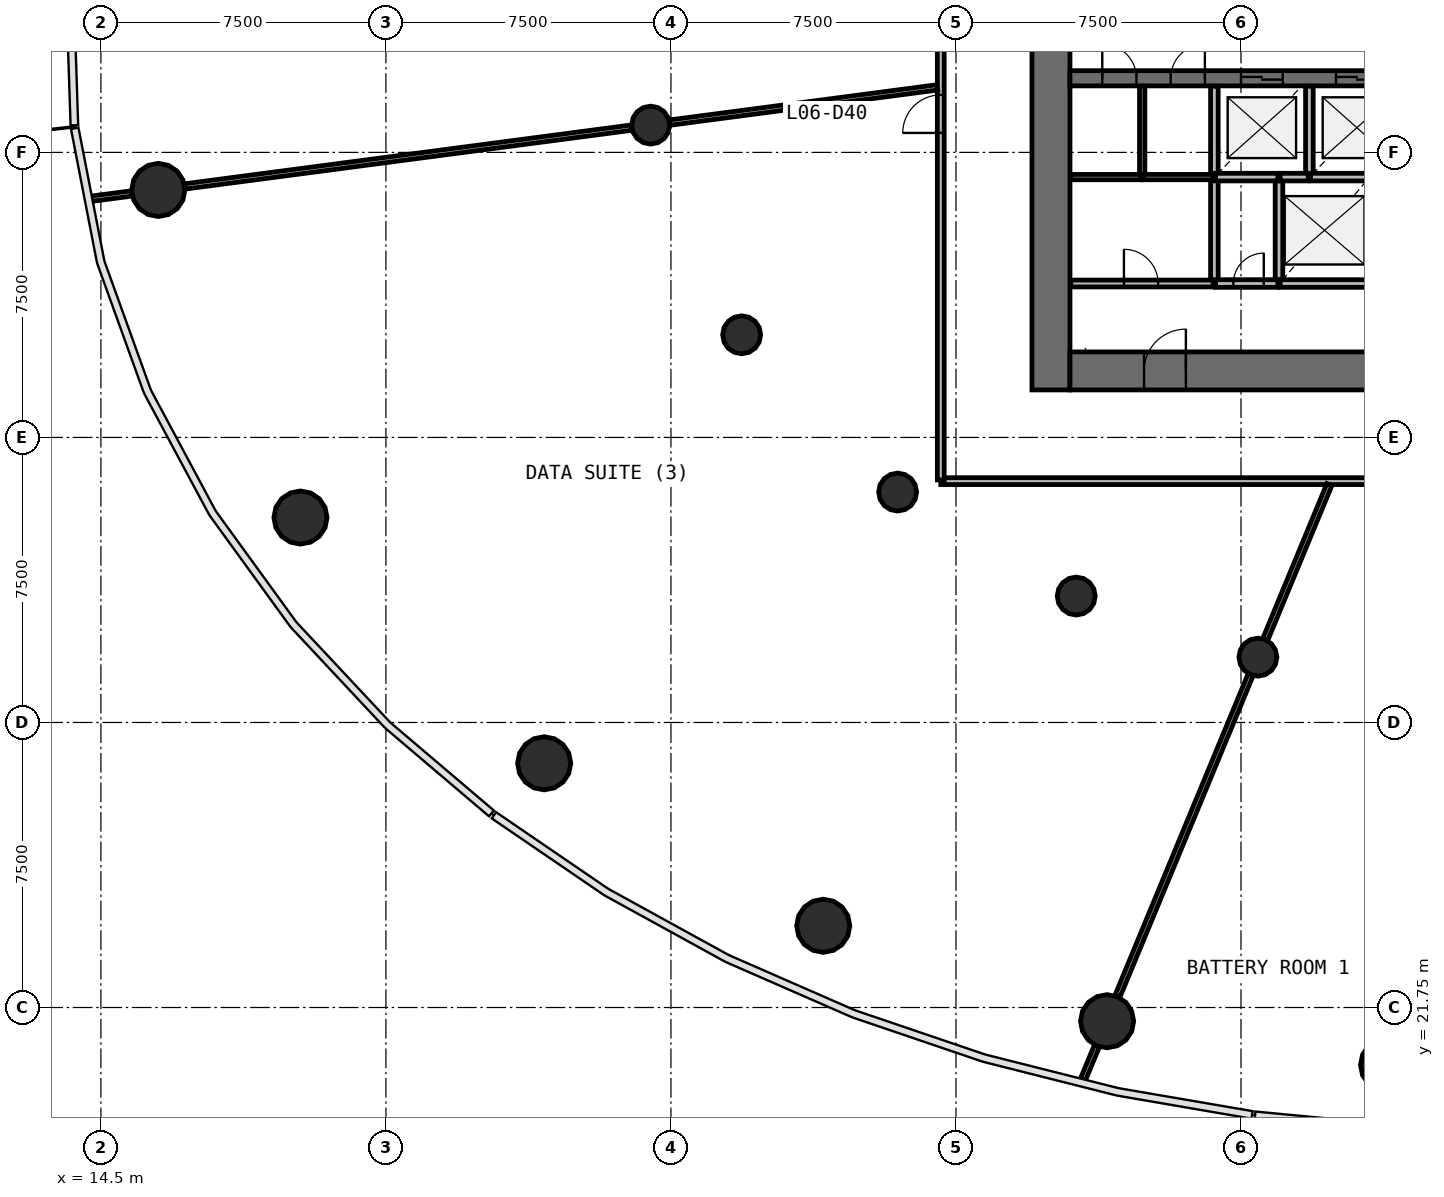
"""IFC4 building model, lengths in metres.
Left out: names, types, materials, properties, quantities, classifications, styles, units other than length and angle.
Written with IfcOpenShell. Run it as: python <this file> out.ifc"""

import sys

from ifc_helpers import new_model, si_unit, direction, frame, frame_2d, origin, origin_2d, place, context, subcontext, project, spatial, rectangle, circle, extrude, source, transform, mapped, element, fill, save


model = new_model("IFC4")
c1 = context("Model", 3, precision=1e-05, world=origin(), true_north=direction((0.0, 1.0)))
c2 = subcontext(c1, "Body", "Model", "MODEL_VIEW")
j1 = project(units=[si_unit("LENGTHUNIT", "METRE"), si_unit("PLANEANGLEUNIT", "RADIAN")], contexts=[c1])
p1 = place(None, origin())
s1 = spatial("IfcSite", under=j1, at=p1, CompositionType="ELEMENT")
p2 = place(p1, origin())
s2 = spatial("IfcBuilding", under=s1, at=p2, CompositionType="ELEMENT")
p3 = place(p2, frame((0.0, 0.0, 27.0)))
s3 = spatial("IfcBuildingStorey", under=s2, at=p3, CompositionType="ELEMENT", Elevation=27.0)
p4 = place(p3, frame((39.5, 58.0, 0.0), z_axis=(0.0, 0.0, 1.0), x_axis=(0.0, -1.0, 0.0)))
e1 = element("IfcWall", 1, at=p4, inside=s3, PredefinedType="SHEAR", context=c2, shape_type="SweptSolid", body=[
    extrude(rectangle(XDim=20.0, YDim=1.0, at=frame_2d((10.0, 0.0))), origin(), (0.0, 0.0, 1.0), 4.4),
])
p5 = place(p4, frame((9.1, 0.0, 0.0)))
e2 = element("IfcOpeningElement", 2, at=p5, cuts=e1, PredefinedType="OPENING", context=c2, shape_type="SweptSolid", body=[
    extrude(rectangle(XDim=1.8, YDim=2.1, at=frame_2d((0.9, 1.05))), frame((0.0, 0.51, 0.0), z_axis=(0.0, -1.0, 0.0), x_axis=(1.0, 0.0, 0.0)), (0.0, 0.0, 1.0), 1.02),
])
p6 = place(p3, frame((40.0, 38.5, 0.0), z_axis=(0.0, 0.0, 1.0), x_axis=(1.0, 0.0, 0.0)))
e3 = element("IfcWall", 3, at=p6, inside=s3, PredefinedType="SHEAR", context=c2, shape_type="SweptSolid", body=[
    extrude(rectangle(XDim=24.0, YDim=1.0, at=frame_2d((12.0, 0.0))), origin(), (0.0, 0.0, 1.0), 4.4),
])
p7 = place(p6, frame((21.45, 0.0, 0.0)))
e4 = element("IfcOpeningElement", 4, at=p7, cuts=e3, PredefinedType="OPENING", context=c2, shape_type="SweptSolid", body=[
    extrude(rectangle(XDim=1.1, YDim=2.1, at=frame_2d((0.55, 1.05))), frame((0.0, 0.51, 0.0), z_axis=(0.0, -1.0, 0.0), x_axis=(1.0, 0.0, 0.0)), (0.0, 0.0, 1.0), 1.02),
])
p8 = place(p6, frame((1.95, 0.0, 0.0)))
e5 = element("IfcOpeningElement", 5, at=p8, cuts=e3, PredefinedType="OPENING", context=c2, shape_type="SweptSolid", body=[
    extrude(rectangle(XDim=1.1, YDim=2.1, at=frame_2d((0.55, 1.05))), frame((0.0, 0.51, 0.0), z_axis=(0.0, -1.0, 0.0), x_axis=(1.0, 0.0, 0.0)), (0.0, 0.0, 1.0), 1.02),
])
p9 = place(p3, frame((40.0, 46.2, 0.0), z_axis=(0.0, 0.0, 1.0), x_axis=(1.0, 0.0, 0.0)))
e6 = element("IfcWall", 6, at=p9, inside=s3, PredefinedType="SHEAR", context=c2, shape_type="SweptSolid", body=[
    extrude(rectangle(XDim=24.0, YDim=0.4, at=frame_2d((12.0, 0.0))), origin(), (0.0, 0.0, 1.0), 4.4),
])
p10 = place(p9, frame((4.5, 0.0, 0.0)))
e7 = element("IfcOpeningElement", 7, at=p10, cuts=e6, PredefinedType="OPENING", context=c2, shape_type="SweptSolid", body=[
    extrude(rectangle(XDim=1.1, YDim=2.1, at=frame_2d((0.55, 1.05))), frame((0.0, 0.21, 0.0), z_axis=(0.0, -1.0, 0.0), x_axis=(1.0, 0.0, 0.0)), (0.0, 0.0, 1.0), 0.42),
])
p11 = place(p9, frame((7.0, 0.0, 0.0)))
e8 = element("IfcOpeningElement", 8, at=p11, cuts=e6, PredefinedType="OPENING", context=c2, shape_type="SweptSolid", body=[
    extrude(rectangle(XDim=1.1, YDim=2.1, at=frame_2d((0.55, 1.05))), frame((0.0, 0.21, 0.0), z_axis=(0.0, -1.0, 0.0), x_axis=(1.0, 0.0, 0.0)), (0.0, 0.0, 1.0), 0.42),
])
p12 = place(p9, frame((9.5, 0.0, 0.0)))
e9 = element("IfcOpeningElement", 9, at=p12, cuts=e6, PredefinedType="OPENING", context=c2, shape_type="SweptSolid", body=[
    extrude(rectangle(XDim=1.1, YDim=2.1, at=frame_2d((0.55, 1.05))), frame((0.0, 0.21, 0.0), z_axis=(0.0, -1.0, 0.0), x_axis=(1.0, 0.0, 0.0)), (0.0, 0.0, 1.0), 0.42),
])
p13 = place(p9, frame((20.45, 0.0, 0.0)))
e10 = element("IfcOpeningElement", 10, at=p13, cuts=e6, PredefinedType="OPENING", context=c2, shape_type="SweptSolid", body=[
    extrude(rectangle(XDim=0.9, YDim=2.1, at=frame_2d((0.45, 1.05))), frame((0.0, 0.21, 0.0), z_axis=(0.0, -1.0, 0.0), x_axis=(1.0, 0.0, 0.0)), (0.0, 0.0, 1.0), 0.42),
])
p14 = place(p9, frame((22.25, 0.0, 0.0)))
e11 = element("IfcOpeningElement", 11, at=p14, cuts=e6, PredefinedType="OPENING", context=c2, shape_type="SweptSolid", body=[
    extrude(rectangle(XDim=0.9, YDim=2.1, at=frame_2d((0.45, 1.05))), frame((0.0, 0.21, 0.0), z_axis=(0.0, -1.0, 0.0), x_axis=(1.0, 0.0, 0.0)), (0.0, 0.0, 1.0), 0.42),
])
p15 = place(p9, frame((0.85, 0.0, 0.0)))
e12 = element("IfcOpeningElement", 12, at=p15, cuts=e6, PredefinedType="OPENING", context=c2, shape_type="SweptSolid", body=[
    extrude(rectangle(XDim=0.9, YDim=2.1, at=frame_2d((0.45, 1.05))), frame((0.0, 0.21, 0.0), z_axis=(0.0, -1.0, 0.0), x_axis=(1.0, 0.0, 0.0)), (0.0, 0.0, 1.0), 0.42),
])
p16 = place(p9, frame((2.65, 0.0, 0.0)))
e13 = element("IfcOpeningElement", 13, at=p16, cuts=e6, PredefinedType="OPENING", context=c2, shape_type="SweptSolid", body=[
    extrude(rectangle(XDim=0.9, YDim=2.1, at=frame_2d((0.45, 1.05))), frame((0.0, 0.21, 0.0), z_axis=(0.0, -1.0, 0.0), x_axis=(1.0, 0.0, 0.0)), (0.0, 0.0, 1.0), 0.42),
])
p17 = place(p9, frame((11.65, 0.0, 0.0)))
e14 = element("IfcOpeningElement", 14, at=p17, cuts=e6, PredefinedType="OPENING", context=c2, shape_type="SweptSolid", body=[
    extrude(rectangle(XDim=0.9, YDim=2.1, at=frame_2d((0.45, 1.05))), frame((0.0, 0.21, 0.0), z_axis=(0.0, -1.0, 0.0), x_axis=(1.0, 0.0, 0.0)), (0.0, 0.0, 1.0), 0.42),
])
m1 = source(origin(), c2, "Body", "SweptSolid", [
    extrude(circle(Radius=0.7, at=origin_2d()), origin(), (0.0, 0.0, 1.0), 4.4),
])
for number, where, z_axis, x_axis in (
    (15, (16.01, 43.262, 0.0), (0.0, 0.0, 1.0), (1.0, 0.0, 0.0)),
    (16, (19.751, 34.642, 0.0), (0.0, 0.0, 1.0), (1.0, 0.0, 0.0)),
    (17, (26.164, 28.176, 0.0), (0.0, 0.0, 1.0), (1.0, 0.0, 0.0)),
    (18, (33.508, 23.9, 0.0), (0.0, 0.0, 1.0), (1.0, 0.0, 0.0)),
    (19, (40.977, 21.389, 0.0), (0.0, 0.0, 1.0), (1.0, 0.0, 0.0)),
    (20, (48.345, 20.239, 0.0), (0.0, 0.0, 1.0), (1.0, 0.0, 0.0)),
):
    element("IfcColumn", number, at=place(p3, frame(where, z_axis=z_axis, x_axis=x_axis)), inside=s3, PredefinedType="COLUMN", context=c2, shape_type="MappedRepresentation", body=[
        mapped(m1, transform((0.0, 0.0, 0.0), scale=1.0)),
    ])
m2 = source(origin(), c2, "Body", "SweptSolid", [
    extrude(circle(Radius=0.5, at=origin_2d()), origin(), (0.0, 0.0, 1.0), 4.4),
])
for number, where, z_axis, x_axis in (
    (21, (28.966, 44.968, 0.0), (0.0, 0.0, 1.0), (1.0, 0.0, 0.0)),
    (22, (31.361, 39.451, 0.0), (0.0, 0.0, 1.0), (1.0, 0.0, 0.0)),
    (23, (35.465, 35.312, 0.0), (0.0, 0.0, 1.0), (1.0, 0.0, 0.0)),
    (24, (40.165, 32.576, 0.0), (0.0, 0.0, 1.0), (1.0, 0.0, 0.0)),
    (25, (44.945, 30.969, 0.0), (0.0, 0.0, 1.0), (1.0, 0.0, 0.0)),
):
    element("IfcColumn", number, at=place(p3, frame(where, z_axis=z_axis, x_axis=x_axis)), inside=s3, PredefinedType="COLUMN", context=c2, shape_type="MappedRepresentation", body=[
        mapped(m2, transform((0.0, 0.0, 0.0), scale=1.0)),
    ])
for number, where, z_axis, x_axis in (
    (26, (43.8, 43.6, 0.0), (0.0, 0.0, 1.0), (0.0, -1.0, 0.0)),
    (27, (45.5, 43.6, 0.0), (0.0, 0.0, 1.0), (0.0, -1.0, 0.0)),
):
    element("IfcWall", number, at=place(p3, frame(where, z_axis=z_axis, x_axis=x_axis)), inside=s3, PredefinedType="SOLIDWALL", context=c2, shape_type="SweptSolid", body=[
        extrude(rectangle(XDim=2.8, YDim=0.2, at=frame_2d((1.4, 0.0))), origin(), (0.0, 0.0, 1.0), 3.95),
    ])
p18 = place(p3, frame((45.53, 40.8, 0.0), z_axis=(0.0, 0.0, 1.0), x_axis=(1.0, 0.0, 0.0)))
e28 = element("IfcWall", 28, at=p18, inside=s3, PredefinedType="SOLIDWALL", context=c2, shape_type="SweptSolid", body=[
    extrude(rectangle(XDim=2.34, YDim=0.2, at=frame_2d((1.17, 0.0))), origin(), (0.0, 0.0, 1.0), 3.95),
])
p19 = place(p3, frame((43.8, 45.99, 0.0), z_axis=(0.0, 0.0, 1.0), x_axis=(0.0, -1.0, 0.0)))
e29 = element("IfcWall", 29, at=p19, inside=s3, PredefinedType="SOLIDWALL", context=c2, shape_type="SweptSolid", body=[
    extrude(rectangle(XDim=2.36, YDim=0.2, at=frame_2d((1.18, 0.0))), origin(), (0.0, 0.0, 1.0), 3.95),
])
p20 = place(p3, frame((46.3, 43.6, 0.0), z_axis=(0.0, 0.0, 1.0), x_axis=(0.0, 1.0, 0.0)))
e30 = element("IfcWall", 30, at=p20, inside=s3, PredefinedType="SOLIDWALL", context=c2, shape_type="SweptSolid", body=[
    extrude(rectangle(XDim=2.39, YDim=0.2, at=frame_2d((1.195, 0.0))), origin(), (0.0, 0.0, 1.0), 3.95),
])
p21 = place(p3, frame((43.83, 43.6, 0.0), z_axis=(0.0, 0.0, 1.0), x_axis=(1.0, 0.0, 0.0)))
e31 = element("IfcWall", 31, at=p21, inside=s3, PredefinedType="SOLIDWALL", context=c2, shape_type="SweptSolid", body=[
    extrude(rectangle(XDim=1.64, YDim=0.2, at=frame_2d((0.82, 0.0))), origin(), (0.0, 0.0, 1.0), 3.95),
])
p22 = place(p3, frame((43.83, 40.8, 0.0), z_axis=(0.0, 0.0, 1.0), x_axis=(1.0, 0.0, 0.0)))
e32 = element("IfcWall", 32, at=p22, inside=s3, PredefinedType="SOLIDWALL", context=c2, shape_type="SweptSolid", body=[
    extrude(rectangle(XDim=1.64, YDim=0.2, at=frame_2d((0.82, 0.0))), origin(), (0.0, 0.0, 1.0), 3.95),
])
p23 = place(p22, frame((0.47, 0.0, 0.0)))
e33 = element("IfcOpeningElement", 33, at=p23, cuts=e32, PredefinedType="OPENING", context=c2, shape_type="SweptSolid", body=[
    extrude(rectangle(XDim=0.8, YDim=2.1, at=frame_2d((0.4, 1.05))), frame((0.0, 0.11, 0.0), z_axis=(0.0, -1.0, 0.0), x_axis=(1.0, 0.0, 0.0)), (0.0, 0.0, 1.0), 0.22),
])
p24 = place(p3, frame((46.33, 43.6, 0.0), z_axis=(0.0, 0.0, 1.0), x_axis=(1.0, 0.0, 0.0)))
e34 = element("IfcWall", 34, at=p24, inside=s3, PredefinedType="SOLIDWALL", context=c2, shape_type="SweptSolid", body=[
    extrude(rectangle(XDim=1.54, YDim=0.2, at=frame_2d((0.77, 0.0))), origin(), (0.0, 0.0, 1.0), 3.95),
])
p25 = place(p3, frame((45.53, 43.6, 0.0), z_axis=(0.0, 0.0, 1.0), x_axis=(1.0, 0.0, 0.0)))
e35 = element("IfcWall", 35, at=p25, inside=s3, PredefinedType="SOLIDWALL", context=c2, shape_type="SweptSolid", body=[
    extrude(rectangle(XDim=0.74, YDim=0.2, at=frame_2d((0.37, 0.0))), origin(), (0.0, 0.0, 1.0), 3.95),
])
p26 = place(p3, frame((67.4, 35.6, 0.0), z_axis=(0.0, 0.0, 1.0), x_axis=(-1.0, 0.0, 0.0)))
e36 = element("IfcWall", 36, at=p26, inside=s3, PredefinedType="PARTITIONING", context=c2, shape_type="SweptSolid", body=[
    extrude(rectangle(XDim=30.8, YDim=0.18, at=frame_2d((15.4, 0.0))), origin(), (0.0, 0.0, 1.0), 3.05),
])
p27 = place(p26, frame((17.35, 0.0, 0.0)))
e37 = element("IfcOpeningElement", 37, at=p27, cuts=e36, PredefinedType="OPENING", context=c2, shape_type="SweptSolid", body=[
    extrude(rectangle(XDim=1.0, YDim=2.1, at=frame_2d((0.5, 1.05))), frame((0.0, 0.1, 0.0), z_axis=(0.0, -1.0, 0.0), x_axis=(1.0, 0.0, 0.0)), (0.0, 0.0, 1.0), 0.2),
])
p28 = place(p26, frame((14.95, 0.0, 0.0)))
e38 = element("IfcOpeningElement", 38, at=p28, cuts=e36, PredefinedType="OPENING", context=c2, shape_type="SweptSolid", body=[
    extrude(rectangle(XDim=1.0, YDim=2.1, at=frame_2d((0.5, 1.05))), frame((0.0, 0.1, 0.0), z_axis=(0.0, -1.0, 0.0), x_axis=(1.0, 0.0, 0.0)), (0.0, 0.0, 1.0), 0.2),
])
p29 = place(p3, frame((36.6, 35.63, 0.0), z_axis=(0.0, 0.0, 1.0), x_axis=(0.0, 1.0, 0.0)))
e39 = element("IfcWall", 39, at=p29, inside=s3, PredefinedType="PARTITIONING", context=c2, shape_type="SweptSolid", body=[
    extrude(rectangle(XDim=23.583, YDim=0.18, at=frame_2d((11.791, 0.0))), origin(), (0.0, 0.0, 1.0), 3.05),
])
p30 = place(p29, frame((11.333, 0.0, 0.0)))
e40 = element("IfcOpeningElement", 40, at=p30, cuts=e39, PredefinedType="OPENING", context=c2, shape_type="SweptSolid", body=[
    extrude(rectangle(XDim=1.0, YDim=2.1, at=frame_2d((0.5, 1.05))), frame((0.0, 0.1, 0.0), z_axis=(0.0, -1.0, 0.0), x_axis=(1.0, 0.0, 0.0)), (0.0, 0.0, 1.0), 0.2),
])
p31 = place(p29, frame((9.133, 0.0, 0.0)))
e41 = element("IfcOpeningElement", 41, at=p31, cuts=e39, PredefinedType="OPENING", context=c2, shape_type="SweptSolid", body=[
    extrude(rectangle(XDim=1.0, YDim=2.1, at=frame_2d((0.5, 1.05))), frame((0.0, 0.1, 0.0), z_axis=(0.0, -1.0, 0.0), x_axis=(1.0, 0.0, 0.0)), (0.0, 0.0, 1.0), 0.2),
])
p32 = place(p3, frame((40.02, 40.8, 0.0), z_axis=(0.0, 0.0, 1.0), x_axis=(1.0, 0.0, 0.0)))
e42 = element("IfcWall", 42, at=p32, inside=s3, PredefinedType="PARTITIONING", context=c2, shape_type="SweptSolid", body=[
    extrude(rectangle(XDim=3.75, YDim=0.18, at=frame_2d((1.875, 0.0))), origin(), (0.0, 0.0, 1.0), 3.95),
])
p33 = place(p32, frame((1.4, 0.0, 0.0)))
e43 = element("IfcOpeningElement", 43, at=p33, cuts=e42, PredefinedType="OPENING", context=c2, shape_type="SweptSolid", body=[
    extrude(rectangle(XDim=0.9, YDim=2.1, at=frame_2d((0.45, 1.05))), frame((0.0, 0.1, 0.0), z_axis=(0.0, -1.0, 0.0), x_axis=(1.0, 0.0, 0.0)), (0.0, 0.0, 1.0), 0.2),
])
p34 = place(p3, frame((28.466, 44.902, 0.0), z_axis=(0.0, 0.0, 1.0), x_axis=(-0.991446586451, -0.130513088287, 0.0)))
e44 = element("IfcWall", 44, at=p34, inside=s3, PredefinedType="PARTITIONING", context=c2, shape_type="SweptSolid", body=[
    extrude(rectangle(XDim=11.86, YDim=0.14, at=frame_2d((5.93, 0.0))), origin(), (0.0, 0.0, 1.0), 3.05),
])
p35 = place(p3, frame((44.752, 30.502, 0.0), z_axis=(0.0, 0.0, 1.0), x_axis=(-0.382672728165, -0.923883966264, 0.0)))
e45 = element("IfcWall", 45, at=p35, inside=s3, PredefinedType="PARTITIONING", context=c2, shape_type="SweptSolid", body=[
    extrude(rectangle(XDim=9.16, YDim=0.14, at=frame_2d((4.58, 0.0))), origin(), (0.0, 0.0, 1.0), 3.05),
])
p36 = place(p3, frame((36.51, 45.961, 0.0), z_axis=(0.0, 0.0, 1.0), x_axis=(-0.99144622305, -0.130515848849, 0.0)))
e46 = element("IfcWall", 46, at=p36, inside=s3, PredefinedType="PARTITIONING", context=c2, shape_type="SweptSolid", body=[
    extrude(rectangle(XDim=7.104, YDim=0.14, at=frame_2d((3.552, 0.0))), origin(), (0.0, 0.0, 1.0), 3.05),
])
p37 = place(p3, frame((46.826, 35.51, 0.0), z_axis=(0.0, 0.0, 1.0), x_axis=(-0.382672831764, -0.923883923353, 0.0)))
e47 = element("IfcWall", 47, at=p37, inside=s3, PredefinedType="PARTITIONING", context=c2, shape_type="SweptSolid", body=[
    extrude(rectangle(XDim=4.41, YDim=0.14, at=frame_2d((2.205, 0.0))), origin(), (0.0, 0.0, 1.0), 3.05),
])
p38 = place(p3, frame((41.9, 43.6, 0.0), z_axis=(0.0, 0.0, 1.0), x_axis=(0.0, 1.0, 0.0)))
e48 = element("IfcWall", 48, at=p38, inside=s3, PredefinedType="PARTITIONING", context=c2, shape_type="SweptSolid", body=[
    extrude(rectangle(XDim=2.39, YDim=0.14, at=frame_2d((1.195, 0.0))), origin(), (0.0, 0.0, 1.0), 3.05),
])
p39 = place(p3, frame((43.77, 43.6, 0.0), z_axis=(0.0, 0.0, 1.0), x_axis=(-1.0, 0.0, 0.0)))
e49 = element("IfcWall", 49, at=p39, inside=s3, PredefinedType="PARTITIONING", context=c2, shape_type="SweptSolid", body=[
    extrude(rectangle(XDim=1.84, YDim=0.14, at=frame_2d((0.92, 0.0))), origin(), (0.0, 0.0, 1.0), 3.05),
])
p40 = place(p3, frame((41.87, 43.6, 0.0), z_axis=(0.0, 0.0, 1.0), x_axis=(-1.0, 0.0, 0.0)))
e50 = element("IfcWall", 50, at=p40, inside=s3, PredefinedType="PARTITIONING", context=c2, shape_type="SweptSolid", body=[
    extrude(rectangle(XDim=1.85, YDim=0.14, at=frame_2d((0.925, 0.0))), origin(), (0.0, 0.0, 1.0), 3.05),
])
p41 = place(p3, frame((15.311, 43.17, 0.0), z_axis=(0.0, 0.0, 1.0), x_axis=(-0.991442282273, -0.13054578094, 0.0)))
e51 = element("IfcWall", 51, at=p41, inside=s3, PredefinedType="PARTITIONING", context=c2, shape_type="SweptSolid", body=[
    extrude(rectangle(XDim=1.107, YDim=0.14, at=frame_2d((0.554, 0.0))), origin(), (0.0, 0.0, 1.0), 3.05),
])
p42 = place(p3, frame((40.708, 20.737, 0.0), z_axis=(0.0, 0.0, 1.0), x_axis=(-0.382814514464, -0.923825225633, 0.0)))
e52 = element("IfcWall", 52, at=p42, inside=s3, PredefinedType="PARTITIONING", context=c2, shape_type="SweptSolid", body=[
    extrude(rectangle(XDim=0.963, YDim=0.14, at=frame_2d((0.481, 0.0))), origin(), (0.0, 0.0, 1.0), 3.05),
])
m3 = source(origin(), c2, "Body", "SweptSolid", [
    extrude(rectangle(XDim=1.1, YDim=2.1, at=frame_2d((0.55, 1.05))), frame((0.0, 0.025, 0.0), z_axis=(0.0, -1.0, 0.0), x_axis=(1.0, 0.0, 0.0)), (0.0, 0.0, 1.0), 0.05),
])
p43 = place(p10, origin())
e53 = element("IfcDoor", 53, at=p43, inside=s3, OperationType="DOUBLE_DOOR_SLIDING", PredefinedType="USERDEFINED", context=c2, shape_type="MappedRepresentation", body=[
    mapped(m3, transform((0.0, 0.0, 0.0), scale=1.0)),
])
fill(e7, e53)
p44 = place(p11, origin())
e54 = element("IfcDoor", 54, at=p44, inside=s3, OperationType="DOUBLE_DOOR_SLIDING", PredefinedType="USERDEFINED", context=c2, shape_type="MappedRepresentation", body=[
    mapped(m3, transform((0.0, 0.0, 0.0), scale=1.0)),
])
fill(e8, e54)
m4 = source(origin(), c2, "Body", "SweptSolid", [
    extrude(rectangle(XDim=0.8, YDim=2.1, at=frame_2d((0.4, 1.05))), frame((0.0, 0.025, 0.0), z_axis=(0.0, -1.0, 0.0), x_axis=(1.0, 0.0, 0.0)), (0.0, 0.0, 1.0), 0.05),
])
p45 = place(p23, origin())
e55 = element("IfcDoor", 55, at=p45, inside=s3, OperationType="SINGLE_SWING_RIGHT", PredefinedType="DOOR", context=c2, shape_type="MappedRepresentation", body=[
    mapped(m4, transform((0.0, 0.0, 0.0), scale=1.0)),
])
fill(e33, e55)
m5 = source(origin(), c2, "Body", "SweptSolid", [
    extrude(rectangle(XDim=1.1, YDim=2.1, at=frame_2d((0.55, 1.05))), frame((0.0, 0.025, 0.0), z_axis=(0.0, -1.0, 0.0), x_axis=(1.0, 0.0, 0.0)), (0.0, 0.0, 1.0), 0.05),
])
p46 = place(p8, origin())
e56 = element("IfcDoor", 56, at=p46, inside=s3, OperationType="SINGLE_SWING_RIGHT", PredefinedType="DOOR", context=c2, shape_type="MappedRepresentation", body=[
    mapped(m5, transform((0.0, 0.0, 0.0), scale=1.0)),
])
fill(e5, e56)
m6 = source(origin(), c2, "Body", "SweptSolid", [
    extrude(rectangle(XDim=1.0, YDim=2.1, at=frame_2d((0.5, 1.05))), frame((0.0, 0.025, 0.0), z_axis=(0.0, -1.0, 0.0), x_axis=(1.0, 0.0, 0.0)), (0.0, 0.0, 1.0), 0.05),
])
p47 = place(p31, origin())
e57 = element("IfcDoor", 57, at=p47, inside=s3, OperationType="SINGLE_SWING_LEFT", PredefinedType="DOOR", context=c2, shape_type="MappedRepresentation", body=[
    mapped(m6, transform((0.0, 0.0, 0.0), scale=1.0)),
])
fill(e41, e57)
m7 = source(origin(), c2, "Body", "SweptSolid", [
    extrude(rectangle(XDim=0.9, YDim=2.1, at=frame_2d((0.45, 1.05))), frame((0.0, 0.025, 0.0), z_axis=(0.0, -1.0, 0.0), x_axis=(1.0, 0.0, 0.0)), (0.0, 0.0, 1.0), 0.05),
])
p48 = place(p33, origin())
e58 = element("IfcDoor", 58, at=p48, inside=s3, OperationType="SINGLE_SWING_LEFT", PredefinedType="DOOR", context=c2, shape_type="MappedRepresentation", body=[
    mapped(m7, transform((0.0, 0.0, 0.0), scale=1.0)),
])
fill(e43, e58)
p49 = place(p15, origin())
e59 = element("IfcDoor", 59, at=p49, inside=s3, OperationType="SINGLE_SWING_LEFT", PredefinedType="DOOR", context=c2, shape_type="MappedRepresentation", body=[
    mapped(m7, transform((0.0, 0.0, 0.0), scale=1.0)),
])
fill(e12, e59)
p50 = place(p16, origin())
e60 = element("IfcDoor", 60, at=p50, inside=s3, OperationType="SINGLE_SWING_RIGHT", PredefinedType="DOOR", context=c2, shape_type="MappedRepresentation", body=[
    mapped(m7, transform((0.0, 0.0, 0.0), scale=1.0)),
])
fill(e13, e60)
save(model, sys.argv[1])
